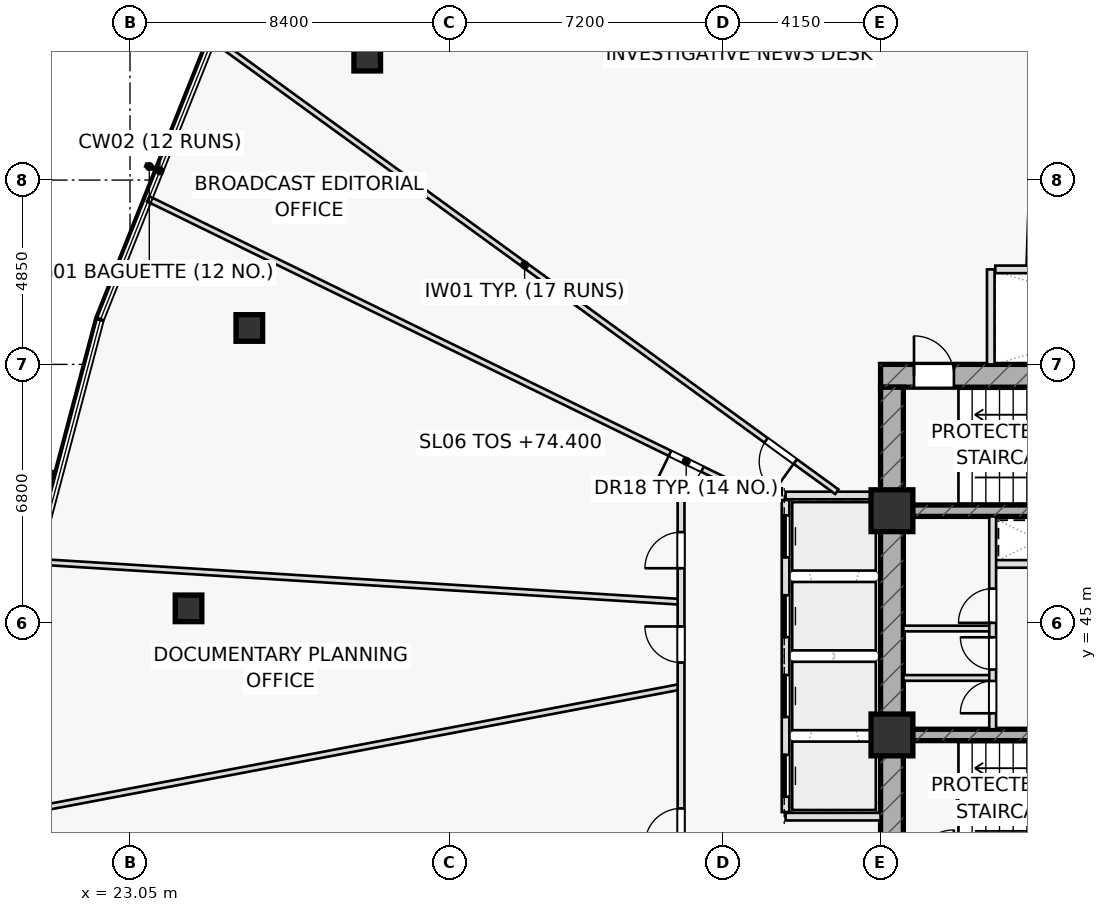
"""IFC4 building model, lengths in metres.
Left out: names, types, materials, properties, quantities, classifications, styles, units other than length and angle.
Written with IfcOpenShell. Run it as: python <this file> out.ifc"""

import sys

from ifc_helpers import new_model, si_unit, direction, frame, frame_2d, origin, origin_2d, place, context, subcontext, project, spatial, rectangle, hollow_rectangle, extrude, element, fill, save


model = new_model("IFC4")
c1 = context("Model", 3, precision=1e-05, world=origin(), true_north=direction((0.0, 1.0)))
c2 = subcontext(c1, "Body", "Model", "MODEL_VIEW")
j1 = project(units=[si_unit("LENGTHUNIT", "METRE"), si_unit("PLANEANGLEUNIT", "RADIAN")], contexts=[c1])
p1 = place(None, origin())
s1 = spatial("IfcSite", under=j1, at=p1, CompositionType="ELEMENT")
p2 = place(p1, origin())
s2 = spatial("IfcBuilding", under=s1, at=p2, CompositionType="ELEMENT")
p3 = place(p2, frame((0.0, 0.0, 74.4)))
s3 = spatial("IfcBuildingStorey", under=s2, at=p3, CompositionType="ELEMENT", Elevation=74.4)
p4 = place(p3, frame((42.8, 51.5, 0.0), z_axis=(0.0, 0.0, 1.0), x_axis=(1.0, 0.0, 0.0)))
e1 = element("IfcWall", 1, at=p4, inside=s3, PredefinedType="SHEAR", context=c2, shape_type="SweptSolid", body=[
    extrude(rectangle(XDim=14.4, YDim=0.6, at=frame_2d((7.2, 0.0))), origin(), (0.0, 0.0, 1.0), 3.6),
])
p5 = place(p4, frame((0.88, 0.0, 0.0)))
e2 = element("IfcOpeningElement", 2, at=p5, cuts=e1, PredefinedType="OPENING", context=c2, shape_type="SweptSolid", body=[
    extrude(rectangle(XDim=1.05, YDim=2.2, at=frame_2d((0.525, 1.1))), frame((0.0, 0.31, 0.0), z_axis=(0.0, -1.0, 0.0), x_axis=(1.0, 0.0, 0.0)), (0.0, 0.0, 1.0), 0.62),
])
p6 = place(p3, frame((43.1, 38.8, 0.0), z_axis=(0.0, 0.0, 1.0), x_axis=(0.0, 1.0, 0.0)))
e3 = element("IfcWall", 3, at=p6, inside=s3, PredefinedType="SHEAR", context=c2, shape_type="SweptSolid", body=[
    extrude(rectangle(XDim=12.4, YDim=0.6, at=frame_2d((6.2, 0.0))), origin(), (0.0, 0.0, 1.0), 3.6),
])
p7 = place(p3, frame((43.4, 47.95, 0.0), z_axis=(0.0, 0.0, 1.0), x_axis=(1.0, 0.0, 0.0)))
e4 = element("IfcWall", 4, at=p7, inside=s3, PredefinedType="SHEAR", context=c2, shape_type="SweptSolid", body=[
    extrude(rectangle(XDim=13.2, YDim=0.3, at=frame_2d((6.6, 0.0))), origin(), (0.0, 0.0, 1.0), 3.6),
])
p8 = place(p7, frame((8.345, 0.0, 0.0)))
e5 = element("IfcOpeningElement", 5, at=p8, cuts=e4, PredefinedType="OPENING", context=c2, shape_type="SweptSolid", body=[
    extrude(rectangle(XDim=1.15, YDim=2.2, at=frame_2d((0.575, 1.1))), frame((0.0, 0.16, 0.0), z_axis=(0.0, -1.0, 0.0), x_axis=(1.0, 0.0, 0.0)), (0.0, 0.0, 1.0), 0.32),
])
p9 = place(p7, frame((10.065, 0.0, 0.0)))
e6 = element("IfcOpeningElement", 6, at=p9, cuts=e4, PredefinedType="OPENING", context=c2, shape_type="SweptSolid", body=[
    extrude(rectangle(XDim=1.15, YDim=2.2, at=frame_2d((0.575, 1.1))), frame((0.0, 0.16, 0.0), z_axis=(0.0, -1.0, 0.0), x_axis=(1.0, 0.0, 0.0)), (0.0, 0.0, 1.0), 0.32),
])
p10 = place(p7, frame((11.645, 0.0, 0.0)))
e7 = element("IfcOpeningElement", 7, at=p10, cuts=e4, PredefinedType="OPENING", context=c2, shape_type="SweptSolid", body=[
    extrude(rectangle(XDim=1.15, YDim=2.2, at=frame_2d((0.575, 1.1))), frame((0.0, 0.16, 0.0), z_axis=(0.0, -1.0, 0.0), x_axis=(1.0, 0.0, 0.0)), (0.0, 0.0, 1.0), 0.32),
])
p11 = place(p3, frame((43.4, 42.05, 0.0), z_axis=(0.0, 0.0, 1.0), x_axis=(1.0, 0.0, 0.0)))
e8 = element("IfcWall", 8, at=p11, inside=s3, PredefinedType="SHEAR", context=c2, shape_type="SweptSolid", body=[
    extrude(rectangle(XDim=13.2, YDim=0.3, at=frame_2d((6.6, 0.0))), origin(), (0.0, 0.0, 1.0), 3.6),
])
for number, where, z_axis, x_axis in (
    (9, (43.1, 47.95, 0.0), (0.0, 0.0, 1.0), (1.0, 0.0, 0.0)),
    (10, (43.1, 42.05, 0.0), (0.0, 0.0, 1.0), (1.0, 0.0, 0.0)),
):
    element("IfcColumn", number, at=place(p3, frame(where, z_axis=z_axis, x_axis=x_axis)), inside=s3, PredefinedType="COLUMN", context=c2, shape_type="SweptSolid", body=[
        extrude(rectangle(XDim=1.1, YDim=1.1, at=origin_2d()), origin(), (0.0, 0.0, 1.0), 3.6),
    ])
for number, where, z_axis, x_axis in (
    (11, (29.292, 59.872, 0.0), (0.0, 0.0, 1.0), (1.0, 0.0, 0.0)),
    (12, (26.189, 52.758, 0.0), (0.0, 0.0, 1.0), (1.0, 0.0, 0.0)),
    (13, (24.59, 45.381, 0.0), (0.0, 0.0, 1.0), (1.0, 0.0, 0.0)),
):
    element("IfcColumn", number, at=place(p3, frame(where, z_axis=z_axis, x_axis=x_axis)), inside=s3, PredefinedType="COLUMN", context=c2, shape_type="SweptSolid", body=[
        extrude(hollow_rectangle(XDim=0.7, YDim=0.7, WallThickness=0.04, at=origin_2d()), origin(), (0.0, 0.0, 1.0), 3.6),
    ])
for number, where, z_axis, x_axis in (
    (14, (40.3, 39.9, 0.0), (0.0, 0.0, 1.0), (1.0, 0.0, 0.0)),
    (15, (40.3, 48.35, 0.0), (0.0, 0.0, 1.0), (1.0, 0.0, 0.0)),
    (16, (45.7, 51.8, 0.0), (0.0, 0.0, 1.0), (0.0, 1.0, 0.0)),
):
    element("IfcWall", number, at=place(p3, frame(where, z_axis=z_axis, x_axis=x_axis)), inside=s3, PredefinedType="PARTITIONING", context=c2, shape_type="SweptSolid", body=[
        extrude(rectangle(XDim=2.5, YDim=0.2, at=frame_2d((1.25, 0.0))), origin(), (0.0, 0.0, 1.0), 3.6),
    ])
p12 = place(p3, frame((45.75, 46.55, 0.0), z_axis=(0.0, 0.0, 1.0), x_axis=(1.0, 0.0, 0.0)))
e17 = element("IfcWall", 17, at=p12, inside=s3, PredefinedType="PARTITIONING", context=c2, shape_type="SweptSolid", body=[
    extrude(rectangle(XDim=2.4, YDim=0.2, at=frame_2d((1.2, 0.0))), origin(), (0.0, 0.0, 1.0), 3.6),
])
for number, where, z_axis, x_axis in (
    (18, (43.4, 43.55, 0.0), (0.0, 0.0, 1.0), (1.0, 0.0, 0.0)),
    (19, (43.4, 44.85, 0.0), (0.0, 0.0, 1.0), (1.0, 0.0, 0.0)),
):
    element("IfcWall", number, at=place(p3, frame(where, z_axis=z_axis, x_axis=x_axis)), inside=s3, PredefinedType="PARTITIONING", context=c2, shape_type="SweptSolid", body=[
        extrude(rectangle(XDim=2.35, YDim=0.15, at=frame_2d((1.175, 0.0))), origin(), (0.0, 0.0, 1.0), 3.6),
    ])
p13 = place(p3, frame((45.75, 42.2, 0.0), z_axis=(0.0, 0.0, 1.0), x_axis=(0.0, 1.0, 0.0)))
e20 = element("IfcWall", 20, at=p13, inside=s3, PredefinedType="PARTITIONING", context=c2, shape_type="SweptSolid", body=[
    extrude(rectangle(XDim=5.6, YDim=0.18, at=frame_2d((2.8, 0.0))), origin(), (0.0, 0.0, 1.0), 3.6),
])
p14 = place(p13, frame((0.42, 0.0, 0.0)))
e21 = element("IfcOpeningElement", 21, at=p14, cuts=e20, PredefinedType="OPENING", context=c2, shape_type="SweptSolid", body=[
    extrude(rectangle(XDim=0.85, YDim=2.05, at=frame_2d((0.425, 1.025))), frame((0.0, 0.1, 0.0), z_axis=(0.0, -1.0, 0.0), x_axis=(1.0, 0.0, 0.0)), (0.0, 0.0, 1.0), 0.2),
])
p15 = place(p13, frame((1.57, 0.0, 0.0)))
e22 = element("IfcOpeningElement", 22, at=p15, cuts=e20, PredefinedType="OPENING", context=c2, shape_type="SweptSolid", body=[
    extrude(rectangle(XDim=0.85, YDim=2.05, at=frame_2d((0.425, 1.025))), frame((0.0, 0.1, 0.0), z_axis=(0.0, -1.0, 0.0), x_axis=(1.0, 0.0, 0.0)), (0.0, 0.0, 1.0), 0.2),
])
p16 = place(p13, frame((2.8, 0.0, 0.0)))
e23 = element("IfcOpeningElement", 23, at=p16, cuts=e20, PredefinedType="OPENING", context=c2, shape_type="SweptSolid", body=[
    extrude(rectangle(XDim=0.9, YDim=2.05, at=frame_2d((0.45, 1.025))), frame((0.0, 0.1, 0.0), z_axis=(0.0, -1.0, 0.0), x_axis=(1.0, 0.0, 0.0)), (0.0, 0.0, 1.0), 0.2),
])
p17 = place(p3, frame((39.326, 48.45, 0.0), z_axis=(0.0, 0.0, 1.0), x_axis=(-0.898795545666, 0.438368072619, 0.0)))
e24 = element("IfcWall", 24, at=p17, inside=s3, PredefinedType="PARTITIONING", context=c2, shape_type="SweptSolid", body=[
    extrude(rectangle(XDim=17.575, YDim=0.15, at=frame_2d((8.788, 0.0))), origin(), (0.0, 0.0, 1.0), 2.975),
])
p18 = place(p17, frame((1.35, 0.0, 0.0)))
e25 = element("IfcOpeningElement", 25, at=p18, cuts=e24, PredefinedType="OPENING", context=c2, shape_type="SweptSolid", body=[
    extrude(rectangle(XDim=0.95, YDim=2.05, at=frame_2d((0.475, 1.025))), frame((0.0, 0.085, 0.0), z_axis=(0.0, -1.0, 0.0), x_axis=(1.0, 0.0, 0.0)), (0.0, 0.0, 1.0), 0.17),
])
p19 = place(p3, frame((37.55, 45.552, 0.0), z_axis=(0.0, 0.0, 1.0), x_axis=(-0.998060836773, 0.062246012719, 0.0)))
e26 = element("IfcWall", 26, at=p19, inside=s3, PredefinedType="PARTITIONING", context=c2, shape_type="SweptSolid", body=[
    extrude(rectangle(XDim=17.007, YDim=0.15, at=frame_2d((8.503, 0.0))), origin(), (0.0, 0.0, 1.0), 2.975),
])
p20 = place(p3, frame((37.55, 43.319, 0.0), z_axis=(0.0, 0.0, 1.0), x_axis=(-0.98244116135, -0.186572678831, 0.0)))
e27 = element("IfcWall", 27, at=p20, inside=s3, PredefinedType="PARTITIONING", context=c2, shape_type="SweptSolid", body=[
    extrude(rectangle(XDim=17.304, YDim=0.15, at=frame_2d((8.652, 0.0))), origin(), (0.0, 0.0, 1.0), 3.025),
])
p21 = place(p3, frame((46.718, 54.45, 0.0), z_axis=(0.0, 0.0, 1.0), x_axis=(0.033606572216, 0.999435139618, 0.0)))
e28 = element("IfcWall", 28, at=p21, inside=s3, PredefinedType="PARTITIONING", context=c2, shape_type="SweptSolid", body=[
    extrude(rectangle(XDim=19.477, YDim=0.15, at=frame_2d((9.738, 0.0))), origin(), (0.0, 0.0, 1.0), 3.025),
])
p22 = place(p3, frame((41.649, 48.45, 0.0), z_axis=(0.0, 0.0, 1.0), x_axis=(-0.809168970715, 0.587576017918, 0.0)))
e29 = element("IfcWall", 29, at=p22, inside=s3, PredefinedType="PARTITIONING", context=c2, shape_type="SweptSolid", body=[
    extrude(rectangle(XDim=20.305, YDim=0.15, at=frame_2d((10.153, 0.0))), origin(), (0.0, 0.0, 1.0), 2.975),
])
p23 = place(p22, frame((1.35, 0.0, 0.0)))
e30 = element("IfcOpeningElement", 30, at=p23, cuts=e29, PredefinedType="OPENING", context=c2, shape_type="SweptSolid", body=[
    extrude(rectangle(XDim=0.95, YDim=2.05, at=frame_2d((0.475, 1.025))), frame((0.0, 0.085, 0.0), z_axis=(0.0, -1.0, 0.0), x_axis=(1.0, 0.0, 0.0)), (0.0, 0.0, 1.0), 0.17),
])
p24 = place(p3, frame((37.55, 35.75, 0.0), z_axis=(0.0, 0.0, 1.0), x_axis=(0.0, 1.0, 0.0)))
e31 = element("IfcWall", 31, at=p24, inside=s3, PredefinedType="PARTITIONING", context=c2, shape_type="SweptSolid", body=[
    extrude(rectangle(XDim=12.75, YDim=0.18, at=frame_2d((6.375, 0.0))), origin(), (0.0, 0.0, 1.0), 2.975),
])
p25 = place(p24, frame((3.417, 0.0, 0.0)))
e32 = element("IfcOpeningElement", 32, at=p25, cuts=e31, PredefinedType="OPENING", context=c2, shape_type="SweptSolid", body=[
    extrude(rectangle(XDim=0.95, YDim=2.05, at=frame_2d((0.475, 1.025))), frame((0.0, 0.1, 0.0), z_axis=(0.0, -1.0, 0.0), x_axis=(1.0, 0.0, 0.0)), (0.0, 0.0, 1.0), 0.2),
])
p26 = place(p24, frame((8.205, 0.0, 0.0)))
e33 = element("IfcOpeningElement", 33, at=p26, cuts=e31, PredefinedType="OPENING", context=c2, shape_type="SweptSolid", body=[
    extrude(rectangle(XDim=0.95, YDim=2.05, at=frame_2d((0.475, 1.025))), frame((0.0, 0.1, 0.0), z_axis=(0.0, -1.0, 0.0), x_axis=(1.0, 0.0, 0.0)), (0.0, 0.0, 1.0), 0.2),
])
p27 = place(p24, frame((10.687, 0.0, 0.0)))
e34 = element("IfcOpeningElement", 34, at=p27, cuts=e31, PredefinedType="OPENING", context=c2, shape_type="SweptSolid", body=[
    extrude(rectangle(XDim=0.95, YDim=2.05, at=frame_2d((0.475, 1.025))), frame((0.0, 0.1, 0.0), z_axis=(0.0, -1.0, 0.0), x_axis=(1.0, 0.0, 0.0)), (0.0, 0.0, 1.0), 0.2),
])
p28 = place(p3, frame((37.5, 48.45, 0.0), z_axis=(0.0, 0.0, 1.0), x_axis=(1.0, 0.0, 0.0)))
e35 = element("IfcWall", 35, at=p28, inside=s3, PredefinedType="PARTITIONING", context=c2, shape_type="SweptSolid", body=[
    extrude(rectangle(XDim=2.7, YDim=0.18, at=frame_2d((1.35, 0.0))), origin(), (0.0, 0.0, 1.0), 3.6),
])
p29 = place(p3, frame((40.3, 40.02, 0.0), z_axis=(0.0, 0.0, 1.0), x_axis=(0.0, 1.0, 0.0)))
e36 = element("IfcWall", 36, at=p29, inside=s3, PredefinedType="PARTITIONING", context=c2, shape_type="SweptSolid", body=[
    extrude(rectangle(XDim=8.21, YDim=0.2, at=frame_2d((4.105, 0.0))), origin(), (0.0, 0.0, 1.0), 3.6),
])
p30 = place(p29, frame((0.405, 0.0, 0.0)))
e37 = element("IfcOpeningElement", 37, at=p30, cuts=e36, PredefinedType="OPENING", context=c2, shape_type="SweptSolid", body=[
    extrude(rectangle(XDim=1.1, YDim=2.15, at=frame_2d((0.55, 1.075))), frame((0.0, 0.11, 0.0), z_axis=(0.0, -1.0, 0.0), x_axis=(1.0, 0.0, 0.0)), (0.0, 0.0, 1.0), 0.22),
])
p31 = place(p29, frame((2.505, 0.0, 0.0)))
e38 = element("IfcOpeningElement", 38, at=p31, cuts=e36, PredefinedType="OPENING", context=c2, shape_type="SweptSolid", body=[
    extrude(rectangle(XDim=1.1, YDim=2.15, at=frame_2d((0.55, 1.075))), frame((0.0, 0.11, 0.0), z_axis=(0.0, -1.0, 0.0), x_axis=(1.0, 0.0, 0.0)), (0.0, 0.0, 1.0), 0.22),
])
p32 = place(p29, frame((4.605, 0.0, 0.0)))
e39 = element("IfcOpeningElement", 39, at=p32, cuts=e36, PredefinedType="OPENING", context=c2, shape_type="SweptSolid", body=[
    extrude(rectangle(XDim=1.1, YDim=2.15, at=frame_2d((0.55, 1.075))), frame((0.0, 0.11, 0.0), z_axis=(0.0, -1.0, 0.0), x_axis=(1.0, 0.0, 0.0)), (0.0, 0.0, 1.0), 0.22),
])
p33 = place(p29, frame((6.705, 0.0, 0.0)))
e40 = element("IfcOpeningElement", 40, at=p33, cuts=e36, PredefinedType="OPENING", context=c2, shape_type="SweptSolid", body=[
    extrude(rectangle(XDim=1.1, YDim=2.15, at=frame_2d((0.55, 1.075))), frame((0.0, 0.11, 0.0), z_axis=(0.0, -1.0, 0.0), x_axis=(1.0, 0.0, 0.0)), (0.0, 0.0, 1.0), 0.22),
])
p34 = place(p3, frame((45.82, 54.3, 0.0), z_axis=(0.0, 0.0, 1.0), x_axis=(1.0, 0.0, 0.0)))
e41 = element("IfcWall", 41, at=p34, inside=s3, PredefinedType="PARTITIONING", context=c2, shape_type="SweptSolid", body=[
    extrude(rectangle(XDim=8.31, YDim=0.2, at=frame_2d((4.155, 0.0))), origin(), (0.0, 0.0, 1.0), 3.6),
])
p35 = place(p5, origin())
e42 = element("IfcDoor", 42, at=p35, inside=s3, OperationType="SINGLE_SWING_LEFT", PredefinedType="DOOR", context=c2, shape_type="SweptSolid", body=[
    extrude(rectangle(XDim=1.05, YDim=2.2, at=frame_2d((0.525, 1.1))), frame((0.0, 0.025, 0.0), z_axis=(0.0, -1.0, 0.0), x_axis=(1.0, 0.0, 0.0)), (0.0, 0.0, 1.0), 0.05),
])
fill(e2, e42)
p36 = place(p14, origin())
e43 = element("IfcDoor", 43, at=p36, inside=s3, OperationType="SINGLE_SWING_LEFT", PredefinedType="DOOR", context=c2, shape_type="SweptSolid", body=[
    extrude(rectangle(XDim=0.85, YDim=2.05, at=frame_2d((0.425, 1.025))), frame((0.0, 0.025, 0.0), z_axis=(0.0, -1.0, 0.0), x_axis=(1.0, 0.0, 0.0)), (0.0, 0.0, 1.0), 0.05),
])
fill(e21, e43)
p37 = place(p15, origin())
e44 = element("IfcDoor", 44, at=p37, inside=s3, OperationType="SINGLE_SWING_RIGHT", PredefinedType="DOOR", context=c2, shape_type="SweptSolid", body=[
    extrude(rectangle(XDim=0.85, YDim=2.05, at=frame_2d((0.425, 1.025))), frame((0.0, 0.025, 0.0), z_axis=(0.0, -1.0, 0.0), x_axis=(1.0, 0.0, 0.0)), (0.0, 0.0, 1.0), 0.05),
])
fill(e22, e44)
p38 = place(p16, origin())
e45 = element("IfcDoor", 45, at=p38, inside=s3, OperationType="SINGLE_SWING_LEFT", PredefinedType="DOOR", context=c2, shape_type="SweptSolid", body=[
    extrude(rectangle(XDim=0.9, YDim=2.05, at=frame_2d((0.45, 1.025))), frame((0.0, 0.025, 0.0), z_axis=(0.0, -1.0, 0.0), x_axis=(1.0, 0.0, 0.0)), (0.0, 0.0, 1.0), 0.05),
])
fill(e23, e45)
p39 = place(p18, origin())
e46 = element("IfcDoor", 46, at=p39, inside=s3, OperationType="SINGLE_SWING_RIGHT", PredefinedType="DOOR", context=c2, shape_type="SweptSolid", body=[
    extrude(rectangle(XDim=0.95, YDim=2.05, at=frame_2d((0.475, 1.025))), frame((0.0, 0.025, 0.0), z_axis=(0.0, -1.0, 0.0), x_axis=(1.0, 0.0, 0.0)), (0.0, 0.0, 1.0), 0.05),
])
fill(e25, e46)
p40 = place(p23, origin())
e47 = element("IfcDoor", 47, at=p40, inside=s3, OperationType="SINGLE_SWING_LEFT", PredefinedType="DOOR", context=c2, shape_type="SweptSolid", body=[
    extrude(rectangle(XDim=0.95, YDim=2.05, at=frame_2d((0.475, 1.025))), frame((0.0, 0.025, 0.0), z_axis=(0.0, -1.0, 0.0), x_axis=(1.0, 0.0, 0.0)), (0.0, 0.0, 1.0), 0.05),
])
fill(e30, e47)
p41 = place(p25, origin())
e48 = element("IfcDoor", 48, at=p41, inside=s3, OperationType="SINGLE_SWING_LEFT", PredefinedType="DOOR", context=c2, shape_type="SweptSolid", body=[
    extrude(rectangle(XDim=0.95, YDim=2.05, at=frame_2d((0.475, 1.025))), frame((0.0, 0.025, 0.0), z_axis=(0.0, -1.0, 0.0), x_axis=(1.0, 0.0, 0.0)), (0.0, 0.0, 1.0), 0.05),
])
fill(e32, e48)
p42 = place(p26, origin())
e49 = element("IfcDoor", 49, at=p42, inside=s3, OperationType="SINGLE_SWING_RIGHT", PredefinedType="DOOR", context=c2, shape_type="SweptSolid", body=[
    extrude(rectangle(XDim=0.95, YDim=2.05, at=frame_2d((0.475, 1.025))), frame((0.0, 0.025, 0.0), z_axis=(0.0, -1.0, 0.0), x_axis=(1.0, 0.0, 0.0)), (0.0, 0.0, 1.0), 0.05),
])
fill(e33, e49)
p43 = place(p27, origin())
e50 = element("IfcDoor", 50, at=p43, inside=s3, OperationType="SINGLE_SWING_LEFT", PredefinedType="DOOR", context=c2, shape_type="SweptSolid", body=[
    extrude(rectangle(XDim=0.95, YDim=2.05, at=frame_2d((0.475, 1.025))), frame((0.0, 0.025, 0.0), z_axis=(0.0, -1.0, 0.0), x_axis=(1.0, 0.0, 0.0)), (0.0, 0.0, 1.0), 0.05),
])
fill(e34, e50)
p44 = place(p30, origin())
e51 = element("IfcDoor", 51, at=p44, inside=s3, OperationType="SLIDING_TO_LEFT", PredefinedType="DOOR", context=c2, shape_type="SweptSolid", body=[
    extrude(rectangle(XDim=1.1, YDim=2.15, at=frame_2d((0.55, 1.075))), frame((0.0, 0.025, 0.0), z_axis=(0.0, -1.0, 0.0), x_axis=(1.0, 0.0, 0.0)), (0.0, 0.0, 1.0), 0.05),
])
fill(e37, e51)
p45 = place(p31, origin())
e52 = element("IfcDoor", 52, at=p45, inside=s3, OperationType="SLIDING_TO_RIGHT", PredefinedType="DOOR", context=c2, shape_type="SweptSolid", body=[
    extrude(rectangle(XDim=1.1, YDim=2.15, at=frame_2d((0.55, 1.075))), frame((0.0, 0.025, 0.0), z_axis=(0.0, -1.0, 0.0), x_axis=(1.0, 0.0, 0.0)), (0.0, 0.0, 1.0), 0.05),
])
fill(e38, e52)
p46 = place(p32, origin())
e53 = element("IfcDoor", 53, at=p46, inside=s3, OperationType="SLIDING_TO_LEFT", PredefinedType="DOOR", context=c2, shape_type="SweptSolid", body=[
    extrude(rectangle(XDim=1.1, YDim=2.15, at=frame_2d((0.55, 1.075))), frame((0.0, 0.025, 0.0), z_axis=(0.0, -1.0, 0.0), x_axis=(1.0, 0.0, 0.0)), (0.0, 0.0, 1.0), 0.05),
])
fill(e39, e53)
p47 = place(p33, origin())
e54 = element("IfcDoor", 54, at=p47, inside=s3, OperationType="SLIDING_TO_RIGHT", PredefinedType="DOOR", context=c2, shape_type="SweptSolid", body=[
    extrude(rectangle(XDim=1.1, YDim=2.15, at=frame_2d((0.55, 1.075))), frame((0.0, 0.025, 0.0), z_axis=(0.0, -1.0, 0.0), x_axis=(1.0, 0.0, 0.0)), (0.0, 0.0, 1.0), 0.05),
])
fill(e40, e54)
save(model, sys.argv[1])
